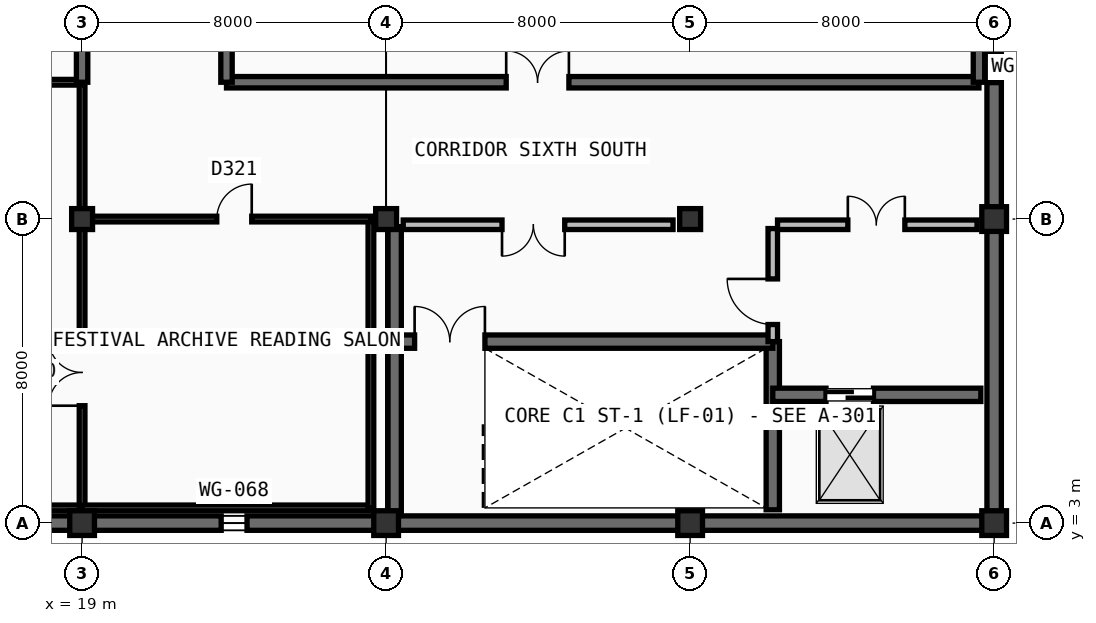
"""IFC4 building model, lengths in metres.
Left out: names, types, materials, properties, quantities, classifications, styles, units other than length and angle.
Written with IfcOpenShell. Run it as: python <this file> out.ifc"""

import sys

from ifc_helpers import new_model, si_unit, direction, frame, frame_2d, origin, origin_2d, place, context, subcontext, project, spatial, rectangle, extrude, element, fill, save


model = new_model("IFC4")
c1 = context("Model", 3, precision=1e-05, world=origin(), true_north=direction((0.0, 1.0)))
c2 = subcontext(c1, "Body", "Model", "MODEL_VIEW")
j1 = project(units=[si_unit("LENGTHUNIT", "METRE"), si_unit("PLANEANGLEUNIT", "RADIAN")], contexts=[c1])
p1 = place(None, origin())
s1 = spatial("IfcSite", under=j1, at=p1, CompositionType="ELEMENT")
p2 = place(p1, origin())
s2 = spatial("IfcBuilding", under=s1, at=p2, CompositionType="ELEMENT")
p3 = place(p2, frame((0.0, 0.0, 27.9)))
s3 = spatial("IfcBuildingStorey", under=s2, at=p3, CompositionType="ELEMENT", Elevation=27.9)
p4 = place(p3, frame((19.0, 3.0, 0.0), z_axis=(0.0, 0.0, 1.0), x_axis=(1.0, 0.0, 0.0)))
e1 = element("IfcColumn", 1, at=p4, inside=s3, PredefinedType="COLUMN", context=c2, shape_type="SweptSolid", body=[
    extrude(rectangle(XDim=0.65, YDim=0.65, at=origin_2d()), origin(), (0.0, 0.0, 1.0), 4.8),
])
p5 = place(p3, frame((19.0, 11.0, 0.0), z_axis=(0.0, 0.0, 1.0), x_axis=(1.0, 0.0, 0.0)))
e2 = element("IfcColumn", 2, at=p5, inside=s3, PredefinedType="COLUMN", context=c2, shape_type="SweptSolid", body=[
    extrude(rectangle(XDim=0.55, YDim=0.55, at=origin_2d()), origin(), (0.0, 0.0, 1.0), 4.8),
])
p6 = place(p3, frame((27.0, 3.0, 0.0), z_axis=(0.0, 0.0, 1.0), x_axis=(1.0, 0.0, 0.0)))
e3 = element("IfcColumn", 3, at=p6, inside=s3, PredefinedType="COLUMN", context=c2, shape_type="SweptSolid", body=[
    extrude(rectangle(XDim=0.65, YDim=0.65, at=origin_2d()), origin(), (0.0, 0.0, 1.0), 4.8),
])
p7 = place(p3, frame((27.0, 11.0, 0.0), z_axis=(0.0, 0.0, 1.0), x_axis=(1.0, 0.0, 0.0)))
e4 = element("IfcColumn", 4, at=p7, inside=s3, PredefinedType="COLUMN", context=c2, shape_type="SweptSolid", body=[
    extrude(rectangle(XDim=0.55, YDim=0.55, at=origin_2d()), origin(), (0.0, 0.0, 1.0), 4.8),
])
p8 = place(p3, frame((35.0, 3.0, 0.0), z_axis=(0.0, 0.0, 1.0), x_axis=(1.0, 0.0, 0.0)))
e5 = element("IfcColumn", 5, at=p8, inside=s3, PredefinedType="COLUMN", context=c2, shape_type="SweptSolid", body=[
    extrude(rectangle(XDim=0.65, YDim=0.65, at=origin_2d()), origin(), (0.0, 0.0, 1.0), 4.8),
])
p9 = place(p3, frame((35.0, 11.0, 0.0), z_axis=(0.0, 0.0, 1.0), x_axis=(1.0, 0.0, 0.0)))
e6 = element("IfcColumn", 6, at=p9, inside=s3, PredefinedType="COLUMN", context=c2, shape_type="SweptSolid", body=[
    extrude(rectangle(XDim=0.55, YDim=0.55, at=origin_2d()), origin(), (0.0, 0.0, 1.0), 4.8),
])
for number, where, z_axis, x_axis in (
    (7, (43.0, 3.0, 0.0), (0.0, 0.0, 1.0), (1.0, 0.0, 0.0)),
    (8, (43.0, 11.0, 0.0), (0.0, 0.0, 1.0), (1.0, 0.0, 0.0)),
):
    element("IfcColumn", number, at=place(p3, frame(where, z_axis=z_axis, x_axis=x_axis)), inside=s3, PredefinedType="COLUMN", context=c2, shape_type="SweptSolid", body=[
        extrude(rectangle(XDim=0.65, YDim=0.65, at=origin_2d()), origin(), (0.0, 0.0, 1.0), 4.8),
    ])
p10 = place(p3, frame((43.0, 19.0, 0.0), z_axis=(0.0, 0.0, 1.0), x_axis=(0.0, -1.0, 0.0)))
e9 = element("IfcWall", 9, at=p10, inside=s3, PredefinedType="SOLIDWALL", context=c2, shape_type="SweptSolid", body=[
    extrude(rectangle(XDim=8.0, YDim=0.38, at=frame_2d((4.0, 0.0))), origin(), (0.0, 0.0, 1.0), 4.8),
])
p11 = place(p10, frame((3.59, 0.0, 1.05)))
e10 = element("IfcOpeningElement", 10, at=p11, cuts=e9, PredefinedType="OPENING", context=c2, shape_type="SweptSolid", body=[
    extrude(rectangle(XDim=0.82, YDim=1.38, at=frame_2d((0.41, 0.69))), frame((0.0, 0.2, 0.0), z_axis=(0.0, -1.0, 0.0), x_axis=(1.0, 0.0, 0.0)), (0.0, 0.0, 1.0), 0.4),
])
for number, where, z_axis, x_axis in (
    (11, (43.0, 11.0, 0.0), (0.0, 0.0, 1.0), (0.0, -1.0, 0.0)),
    (12, (43.0, 3.0, 0.0), (0.0, 0.0, 1.0), (-1.0, 0.0, 0.0)),
    (13, (35.0, 3.0, 0.0), (0.0, 0.0, 1.0), (-1.0, 0.0, 0.0)),
):
    element("IfcWall", number, at=place(p3, frame(where, z_axis=z_axis, x_axis=x_axis)), inside=s3, PredefinedType="SOLIDWALL", context=c2, shape_type="SweptSolid", body=[
        extrude(rectangle(XDim=8.0, YDim=0.38, at=frame_2d((4.0, 0.0))), origin(), (0.0, 0.0, 1.0), 4.8),
    ])
p12 = place(p3, frame((27.0, 3.0, 0.0), z_axis=(0.0, 0.0, 1.0), x_axis=(-1.0, 0.0, 0.0)))
e14 = element("IfcWall", 14, at=p12, inside=s3, PredefinedType="SOLIDWALL", context=c2, shape_type="SweptSolid", body=[
    extrude(rectangle(XDim=8.0, YDim=0.38, at=frame_2d((4.0, 0.0))), origin(), (0.0, 0.0, 1.0), 4.8),
])
p13 = place(p12, frame((3.66, 0.0, 1.05)))
e15 = element("IfcOpeningElement", 15, at=p13, cuts=e14, PredefinedType="OPENING", context=c2, shape_type="SweptSolid", body=[
    extrude(rectangle(XDim=0.68, YDim=1.15, at=frame_2d((0.34, 0.575))), frame((0.0, 0.2, 0.0), z_axis=(0.0, -1.0, 0.0), x_axis=(1.0, 0.0, 0.0)), (0.0, 0.0, 1.0), 0.4),
])
p14 = place(p3, frame((19.0, 3.0, 0.0), z_axis=(0.0, 0.0, 1.0), x_axis=(-1.0, 0.0, 0.0)))
e16 = element("IfcWall", 16, at=p14, inside=s3, PredefinedType="SOLIDWALL", context=c2, shape_type="SweptSolid", body=[
    extrude(rectangle(XDim=8.0, YDim=0.38, at=frame_2d((4.0, 0.0))), origin(), (0.0, 0.0, 1.0), 4.8),
])
p15 = place(p14, frame((3.625, 0.0, 1.05)))
e17 = element("IfcOpeningElement", 17, at=p15, cuts=e16, PredefinedType="OPENING", context=c2, shape_type="SweptSolid", body=[
    extrude(rectangle(XDim=0.75, YDim=1.3, at=frame_2d((0.375, 0.65))), frame((0.0, 0.2, 0.0), z_axis=(0.0, -1.0, 0.0), x_axis=(1.0, 0.0, 0.0)), (0.0, 0.0, 1.0), 0.4),
])
p16 = place(p3, frame((27.225, 3.2, 0.0), z_axis=(0.0, 0.0, 1.0), x_axis=(0.0, 1.0, 0.0)))
e18 = element("IfcWall", 18, at=p16, inside=s3, PredefinedType="SHEAR", context=c2, shape_type="SweptSolid", body=[
    extrude(rectangle(XDim=7.6, YDim=0.35, at=frame_2d((3.8, 0.0))), origin(), (0.0, 0.0, 1.0), 4.54),
])
p17 = place(p3, frame((37.175, 3.35, 0.0), z_axis=(0.0, 0.0, 1.0), x_axis=(0.0, 1.0, 0.0)))
e19 = element("IfcWall", 19, at=p17, inside=s3, PredefinedType="SHEAR", context=c2, shape_type="SweptSolid", body=[
    extrude(rectangle(XDim=4.425, YDim=0.35, at=frame_2d((2.212, 0.0))), origin(), (0.0, 0.0, 1.0), 4.54),
])
p18 = place(p3, frame((27.35, 7.775, 0.0), z_axis=(0.0, 0.0, 1.0), x_axis=(1.0, 0.0, 0.0)))
e20 = element("IfcWall", 20, at=p18, inside=s3, PredefinedType="SHEAR", context=c2, shape_type="SweptSolid", body=[
    extrude(rectangle(XDim=9.825, YDim=0.35, at=frame_2d((4.913, 0.0))), origin(), (0.0, 0.0, 1.0), 4.54),
])
p19 = place(p18, frame((0.4, 0.0, 0.0)))
e21 = element("IfcOpeningElement", 21, at=p19, cuts=e20, PredefinedType="OPENING", context=c2, shape_type="SweptSolid", body=[
    extrude(rectangle(XDim=1.85, YDim=2.25, at=frame_2d((0.925, 1.125))), frame((0.0, 0.185, 0.0), z_axis=(0.0, -1.0, 0.0), x_axis=(1.0, 0.0, 0.0)), (0.0, 0.0, 1.0), 0.37),
])
p20 = place(p3, frame((37.175, 6.375, 0.0), z_axis=(0.0, 0.0, 1.0), x_axis=(1.0, 0.0, 0.0)))
e22 = element("IfcWall", 22, at=p20, inside=s3, PredefinedType="SHEAR", context=c2, shape_type="SweptSolid", body=[
    extrude(rectangle(XDim=5.475, YDim=0.35, at=frame_2d((2.737, 0.0))), origin(), (0.0, 0.0, 1.0), 4.54),
])
p21 = place(p20, frame((1.4, 0.0, 0.0)))
e23 = element("IfcOpeningElement", 23, at=p21, cuts=e22, PredefinedType="OPENING", context=c2, shape_type="SweptSolid", body=[
    extrude(rectangle(XDim=1.25, YDim=2.25, at=frame_2d((0.625, 1.125))), frame((0.0, 0.185, 0.0), z_axis=(0.0, -1.0, 0.0), x_axis=(1.0, 0.0, 0.0)), (0.0, 0.0, 1.0), 0.37),
])
p22 = place(p3, frame((37.175, 7.775, 0.0), z_axis=(0.0, 0.0, 1.0), x_axis=(0.0, 1.0, 0.0)))
e24 = element("IfcWall", 24, at=p22, inside=s3, PredefinedType="PARTITIONING", context=c2, shape_type="SweptSolid", body=[
    extrude(rectangle(XDim=2.975, YDim=0.25, at=frame_2d((1.488, 0.0))), origin(), (0.0, 0.0, 1.0), 4.54),
])
p23 = place(p22, frame((0.45, 0.0, 0.0)))
e25 = element("IfcOpeningElement", 25, at=p23, cuts=e24, PredefinedType="OPENING", context=c2, shape_type="SweptSolid", body=[
    extrude(rectangle(XDim=1.2, YDim=2.2, at=frame_2d((0.6, 1.1))), frame((0.0, 0.135, 0.0), z_axis=(0.0, -1.0, 0.0), x_axis=(1.0, 0.0, 0.0)), (0.0, 0.0, 1.0), 0.27),
])
p24 = place(p3, frame((27.45, 10.85, 0.0), z_axis=(0.0, 0.0, 1.0), x_axis=(1.0, 0.0, 0.0)))
e26 = element("IfcWall", 26, at=p24, inside=s3, PredefinedType="PARTITIONING", context=c2, shape_type="SweptSolid", body=[
    extrude(rectangle(XDim=7.1, YDim=0.25, at=frame_2d((3.55, 0.0))), origin(), (0.0, 0.0, 1.0), 4.54),
])
p25 = place(p24, frame((2.6, 0.0, 0.0)))
e27 = element("IfcOpeningElement", 27, at=p25, cuts=e26, PredefinedType="OPENING", context=c2, shape_type="SweptSolid", body=[
    extrude(rectangle(XDim=1.65, YDim=2.25, at=frame_2d((0.825, 1.125))), frame((0.0, 0.135, 0.0), z_axis=(0.0, -1.0, 0.0), x_axis=(1.0, 0.0, 0.0)), (0.0, 0.0, 1.0), 0.27),
])
p26 = place(p3, frame((37.3, 10.85, 0.0), z_axis=(0.0, 0.0, 1.0), x_axis=(1.0, 0.0, 0.0)))
e28 = element("IfcWall", 28, at=p26, inside=s3, PredefinedType="PARTITIONING", context=c2, shape_type="SweptSolid", body=[
    extrude(rectangle(XDim=5.25, YDim=0.25, at=frame_2d((2.625, 0.0))), origin(), (0.0, 0.0, 1.0), 4.54),
])
p27 = place(p26, frame((1.85, 0.0, 0.0)))
e29 = element("IfcOpeningElement", 29, at=p27, cuts=e28, PredefinedType="OPENING", context=c2, shape_type="SweptSolid", body=[
    extrude(rectangle(XDim=1.5, YDim=2.2, at=frame_2d((0.75, 1.1))), frame((0.0, 0.135, 0.0), z_axis=(0.0, -1.0, 0.0), x_axis=(1.0, 0.0, 0.0)), (0.0, 0.0, 1.0), 0.27),
])
p28 = place(p3, frame((5.4, 3.4, 0.0), z_axis=(0.0, 0.0, 1.0), x_axis=(1.0, 0.0, 0.0)))
e30 = element("IfcWall", 30, at=p28, inside=s3, PredefinedType="PARTITIONING", context=c2, shape_type="SweptSolid", body=[
    extrude(rectangle(XDim=13.6, YDim=0.15, at=frame_2d((6.8, 0.0))), origin(), (0.0, 0.0, 1.0), 4.54),
])
p29 = place(p3, frame((19.0, 3.4, 0.0), z_axis=(0.0, 0.0, 1.0), x_axis=(0.0, 1.0, 0.0)))
e31 = element("IfcWall", 31, at=p29, inside=s3, PredefinedType="PARTITIONING", context=c2, shape_type="SweptSolid", body=[
    extrude(rectangle(XDim=11.2, YDim=0.15, at=frame_2d((5.6, 0.0))), origin(), (0.0, 0.0, 1.0), 4.54),
])
p30 = place(p29, frame((2.689, 0.0, 0.0)))
e32 = element("IfcOpeningElement", 32, at=p30, cuts=e31, PredefinedType="OPENING", context=c2, shape_type="SweptSolid", body=[
    extrude(rectangle(XDim=1.75, YDim=2.3, at=frame_2d((0.875, 1.15))), frame((0.0, 0.085, 0.0), z_axis=(0.0, -1.0, 0.0), x_axis=(1.0, 0.0, 0.0)), (0.0, 0.0, 1.0), 0.17),
])
p31 = place(p3, frame((5.4, 14.6, 0.0), z_axis=(0.0, 0.0, 1.0), x_axis=(1.0, 0.0, 0.0)))
e33 = element("IfcWall", 33, at=p31, inside=s3, PredefinedType="PARTITIONING", context=c2, shape_type="SweptSolid", body=[
    extrude(rectangle(XDim=13.6, YDim=0.15, at=frame_2d((6.8, 0.0))), origin(), (0.0, 0.0, 1.0), 4.54),
])
for number, where, z_axis, x_axis in (
    (34, (19.0, 3.4, 0.0), (0.0, 0.0, 1.0), (1.0, 0.0, 0.0)),
    (35, (26.6, 3.4, 0.0), (0.0, 0.0, 1.0), (0.0, 1.0, 0.0)),
):
    element("IfcWall", number, at=place(p3, frame(where, z_axis=z_axis, x_axis=x_axis)), inside=s3, PredefinedType="PARTITIONING", context=c2, shape_type="SweptSolid", body=[
        extrude(rectangle(XDim=7.6, YDim=0.15, at=frame_2d((3.8, 0.0))), origin(), (0.0, 0.0, 1.0), 4.54),
    ])
p32 = place(p3, frame((19.0, 11.0, 0.0), z_axis=(0.0, 0.0, 1.0), x_axis=(1.0, 0.0, 0.0)))
e36 = element("IfcWall", 36, at=p32, inside=s3, PredefinedType="PARTITIONING", context=c2, shape_type="SweptSolid", body=[
    extrude(rectangle(XDim=7.6, YDim=0.15, at=frame_2d((3.8, 0.0))), origin(), (0.0, 0.0, 1.0), 4.54),
])
p33 = place(p32, frame((3.544, 0.0, 0.0)))
e37 = element("IfcOpeningElement", 37, at=p33, cuts=e36, PredefinedType="OPENING", context=c2, shape_type="SweptSolid", body=[
    extrude(rectangle(XDim=0.92, YDim=2.1, at=frame_2d((0.46, 1.05))), frame((0.0, 0.085, 0.0), z_axis=(0.0, -1.0, 0.0), x_axis=(1.0, 0.0, 0.0)), (0.0, 0.0, 1.0), 0.17),
])
p34 = place(p3, frame((19.0, 14.6, 0.0), z_axis=(0.0, 0.0, 1.0), x_axis=(0.0, 1.0, 0.0)))
e38 = element("IfcWall", 38, at=p34, inside=s3, PredefinedType="SHEAR", context=c2, shape_type="SweptSolid", body=[
    extrude(rectangle(XDim=12.0, YDim=0.3, at=frame_2d((6.0, 0.0))), origin(), (0.0, 0.0, 1.0), 4.54),
])
p35 = place(p34, frame((7.538, 0.0, 0.0)))
e39 = element("IfcOpeningElement", 39, at=p35, cuts=e38, PredefinedType="OPENING", context=c2, shape_type="SweptSolid", body=[
    extrude(rectangle(XDim=1.75, YDim=2.28, at=frame_2d((0.875, 1.14))), frame((0.0, 0.16, 0.0), z_axis=(0.0, -1.0, 0.0), x_axis=(1.0, 0.0, 0.0)), (0.0, 0.0, 1.0), 0.32),
])
p36 = place(p3, frame((22.8, 14.6, 0.0), z_axis=(0.0, 0.0, 1.0), x_axis=(1.0, 0.0, 0.0)))
e40 = element("IfcWall", 40, at=p36, inside=s3, PredefinedType="SHEAR", context=c2, shape_type="SweptSolid", body=[
    extrude(rectangle(XDim=19.8, YDim=0.3, at=frame_2d((9.9, 0.0))), origin(), (0.0, 0.0, 1.0), 4.54),
])
p37 = place(p36, frame((7.36, 0.0, 0.0)))
e41 = element("IfcOpeningElement", 41, at=p37, cuts=e40, PredefinedType="OPENING", context=c2, shape_type="SweptSolid", body=[
    extrude(rectangle(XDim=1.65, YDim=2.25, at=frame_2d((0.825, 1.125))), frame((0.0, 0.16, 0.0), z_axis=(0.0, -1.0, 0.0), x_axis=(1.0, 0.0, 0.0)), (0.0, 0.0, 1.0), 0.32),
])
for number, where, z_axis, x_axis in (
    (42, (42.6, 14.6, 0.0), (0.0, 0.0, 1.0), (0.0, 1.0, 0.0)),
    (43, (22.8, 14.6, 0.0), (0.0, 0.0, 1.0), (0.0, 1.0, 0.0)),
):
    element("IfcWall", number, at=place(p3, frame(where, z_axis=z_axis, x_axis=x_axis)), inside=s3, PredefinedType="SHEAR", context=c2, shape_type="SweptSolid", body=[
        extrude(rectangle(XDim=12.0, YDim=0.3, at=frame_2d((6.0, 0.0))), origin(), (0.0, 0.0, 1.0), 4.54),
    ])
p38 = place(p11, origin())
e44 = element("IfcWindow", 44, at=p38, inside=s3, PartitioningType="SINGLE_PANEL", PredefinedType="WINDOW", context=c2, shape_type="SweptSolid", body=[
    extrude(rectangle(XDim=0.82, YDim=1.38, at=frame_2d((0.41, 0.69))), frame((0.0, 0.03, 0.0), z_axis=(0.0, -1.0, 0.0), x_axis=(1.0, 0.0, 0.0)), (0.0, 0.0, 1.0), 0.06),
])
fill(e10, e44)
p39 = place(p13, origin())
e45 = element("IfcWindow", 45, at=p39, inside=s3, PartitioningType="SINGLE_PANEL", PredefinedType="WINDOW", context=c2, shape_type="SweptSolid", body=[
    extrude(rectangle(XDim=0.68, YDim=1.15, at=frame_2d((0.34, 0.575))), frame((0.0, 0.03, 0.0), z_axis=(0.0, -1.0, 0.0), x_axis=(1.0, 0.0, 0.0)), (0.0, 0.0, 1.0), 0.06),
])
fill(e15, e45)
p40 = place(p19, origin())
e46 = element("IfcDoor", 46, at=p40, inside=s3, OperationType="DOUBLE_DOOR_SINGLE_SWING", PredefinedType="DOOR", context=c2, shape_type="SweptSolid", body=[
    extrude(rectangle(XDim=1.85, YDim=2.25, at=frame_2d((0.925, 1.125))), frame((0.0, 0.025, 0.0), z_axis=(0.0, -1.0, 0.0), x_axis=(1.0, 0.0, 0.0)), (0.0, 0.0, 1.0), 0.05),
])
fill(e21, e46)
p41 = place(p21, origin())
e47 = element("IfcDoor", 47, at=p41, inside=s3, OperationType="DOUBLE_DOOR_SLIDING", PredefinedType="DOOR", context=c2, shape_type="SweptSolid", body=[
    extrude(rectangle(XDim=1.25, YDim=2.25, at=frame_2d((0.625, 1.125))), frame((0.0, 0.025, 0.0), z_axis=(0.0, -1.0, 0.0), x_axis=(1.0, 0.0, 0.0)), (0.0, 0.0, 1.0), 0.05),
])
fill(e23, e47)
p42 = place(p23, origin())
e48 = element("IfcDoor", 48, at=p42, inside=s3, OperationType="SINGLE_SWING_RIGHT", PredefinedType="DOOR", context=c2, shape_type="SweptSolid", body=[
    extrude(rectangle(XDim=1.2, YDim=2.2, at=frame_2d((0.6, 1.1))), frame((0.0, 0.025, 0.0), z_axis=(0.0, -1.0, 0.0), x_axis=(1.0, 0.0, 0.0)), (0.0, 0.0, 1.0), 0.05),
])
fill(e25, e48)
p43 = place(p25, frame((1.65, 0.0, 0.0), z_axis=(0.0, 0.0, 1.0), x_axis=(-1.0, 0.0, 0.0)))
e49 = element("IfcDoor", 49, at=p43, inside=s3, OperationType="DOUBLE_DOOR_SINGLE_SWING", PredefinedType="DOOR", context=c2, shape_type="SweptSolid", body=[
    extrude(rectangle(XDim=1.65, YDim=2.25, at=frame_2d((0.825, 1.125))), frame((0.0, 0.025, 0.0), z_axis=(0.0, -1.0, 0.0), x_axis=(1.0, 0.0, 0.0)), (0.0, 0.0, 1.0), 0.05),
])
fill(e27, e49)
p44 = place(p27, origin())
e50 = element("IfcDoor", 50, at=p44, inside=s3, OperationType="DOUBLE_DOOR_SINGLE_SWING", PredefinedType="DOOR", context=c2, shape_type="SweptSolid", body=[
    extrude(rectangle(XDim=1.5, YDim=2.2, at=frame_2d((0.75, 1.1))), frame((0.0, 0.025, 0.0), z_axis=(0.0, -1.0, 0.0), x_axis=(1.0, 0.0, 0.0)), (0.0, 0.0, 1.0), 0.05),
])
fill(e29, e50)
p45 = place(p30, origin())
e51 = element("IfcDoor", 51, at=p45, inside=s3, OperationType="DOUBLE_DOOR_SINGLE_SWING", PredefinedType="DOOR", context=c2, shape_type="SweptSolid", body=[
    extrude(rectangle(XDim=1.75, YDim=2.3, at=frame_2d((0.875, 1.15))), frame((0.0, 0.025, 0.0), z_axis=(0.0, -1.0, 0.0), x_axis=(1.0, 0.0, 0.0)), (0.0, 0.0, 1.0), 0.05),
])
fill(e32, e51)
p46 = place(p33, origin())
e52 = element("IfcDoor", 52, at=p46, inside=s3, OperationType="SINGLE_SWING_RIGHT", PredefinedType="DOOR", context=c2, shape_type="SweptSolid", body=[
    extrude(rectangle(XDim=0.92, YDim=2.1, at=frame_2d((0.46, 1.05))), frame((0.0, 0.025, 0.0), z_axis=(0.0, -1.0, 0.0), x_axis=(1.0, 0.0, 0.0)), (0.0, 0.0, 1.0), 0.05),
])
fill(e37, e52)
p47 = place(p37, origin())
e53 = element("IfcDoor", 53, at=p47, inside=s3, OperationType="DOUBLE_DOOR_SINGLE_SWING", PredefinedType="DOOR", context=c2, shape_type="SweptSolid", body=[
    extrude(rectangle(XDim=1.65, YDim=2.25, at=frame_2d((0.825, 1.125))), frame((0.0, 0.025, 0.0), z_axis=(0.0, -1.0, 0.0), x_axis=(1.0, 0.0, 0.0)), (0.0, 0.0, 1.0), 0.05),
])
fill(e41, e53)
save(model, sys.argv[1])
